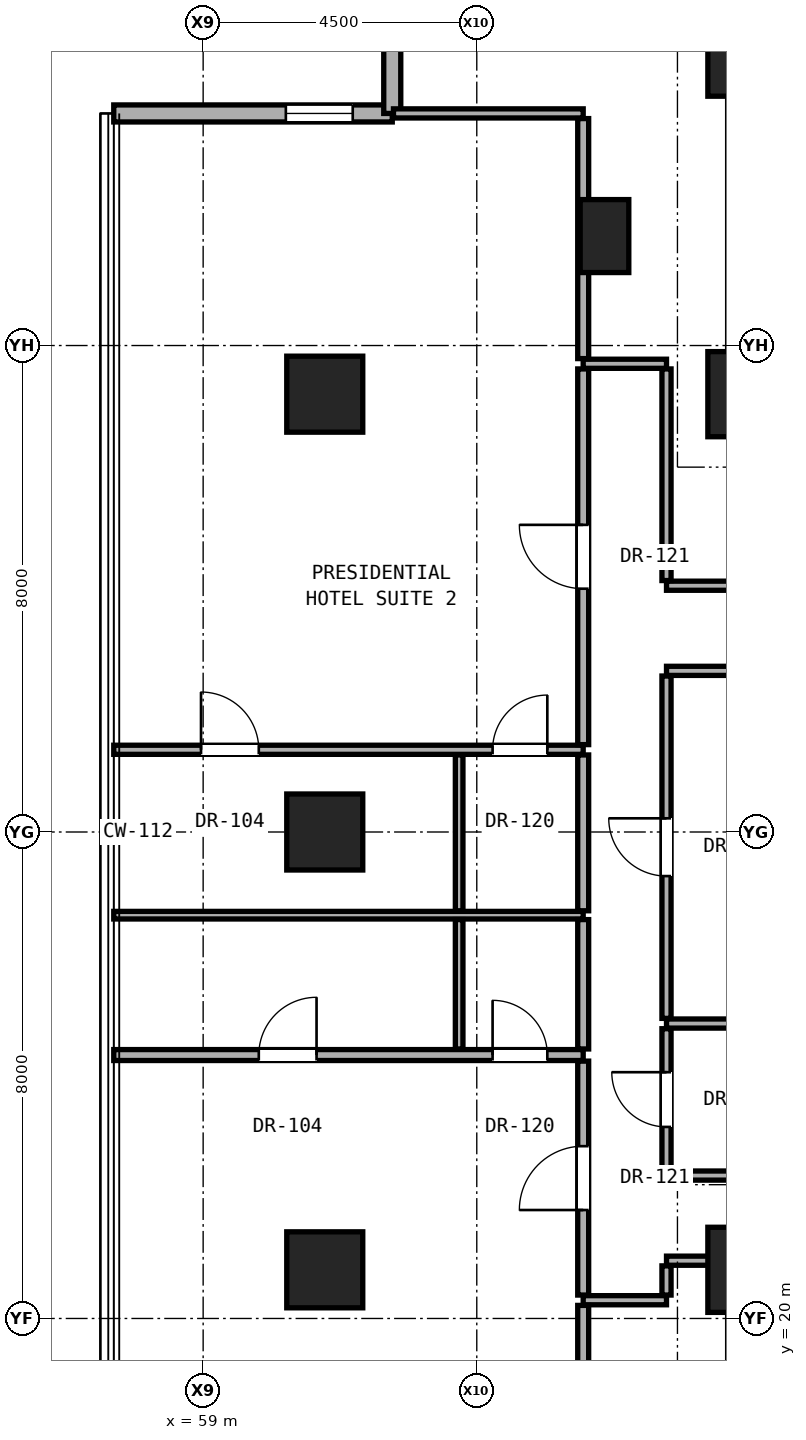
"""IFC4 building model, lengths in metres.
Left out: names, types, materials, properties, quantities, classifications, styles, units other than length and angle.
Written with IfcOpenShell. Run it as: python <this file> out.ifc"""

import sys

from ifc_helpers import new_model, si_unit, direction, frame, frame_2d, origin, origin_2d, place, context, subcontext, project, spatial, rectangle, hollow_rectangle, extrude, element, fill, save


model = new_model("IFC4")
c1 = context("Model", 3, precision=1e-05, world=origin(), true_north=direction((0.0, 1.0)))
c2 = subcontext(c1, "Body", "Model", "MODEL_VIEW")
j1 = project(units=[si_unit("LENGTHUNIT", "METRE"), si_unit("PLANEANGLEUNIT", "RADIAN")], contexts=[c1])
p1 = place(None, origin())
s1 = spatial("IfcSite", under=j1, at=p1, CompositionType="ELEMENT")
p2 = place(p1, origin())
s2 = spatial("IfcBuilding", under=s1, at=p2, CompositionType="ELEMENT")
p3 = place(p2, frame((0.0, 0.0, 38.9)))
s3 = spatial("IfcBuildingStorey", under=s2, at=p3, CompositionType="ELEMENT", Elevation=38.9)
for number, where, z_axis, x_axis in (
    (1, (68.0, 20.8, 0.0), (0.0, 0.0, 1.0), (1.0, 0.0, 0.0)),
    (2, (68.0, 35.2, 0.0), (0.0, 0.0, 1.0), (1.0, 0.0, 0.0)),
    (3, (68.0, 40.8, 0.0), (0.0, 0.0, 1.0), (1.0, 0.0, 0.0)),
):
    element("IfcColumn", number, at=place(p3, frame(where, z_axis=z_axis, x_axis=x_axis)), inside=s3, PredefinedType="COLUMN", context=c2, shape_type="SweptSolid", body=[
        extrude(rectangle(XDim=1.4, YDim=1.4, at=origin_2d()), origin(), (0.0, 0.0, 1.0), 3.3),
    ])
for number, where, z_axis, x_axis in (
    (4, (61.0, 20.8, 0.0), (0.0, 0.0, 1.0), (1.0, 0.0, 0.0)),
    (5, (61.0, 28.0, 0.0), (0.0, 0.0, 1.0), (1.0, 0.0, 0.0)),
    (6, (61.0, 35.2, 0.0), (0.0, 0.0, 1.0), (1.0, 0.0, 0.0)),
):
    element("IfcColumn", number, at=place(p3, frame(where, z_axis=z_axis, x_axis=x_axis)), inside=s3, PredefinedType="COLUMN", context=c2, shape_type="SweptSolid", body=[
        extrude(hollow_rectangle(XDim=1.25, YDim=1.25, WallThickness=0.07, at=origin_2d()), origin(), (0.0, 0.0, 1.0), 3.3),
    ])
p4 = place(p3, frame((65.6, 37.8, 0.0), z_axis=(0.0, 0.0, 1.0), x_axis=(1.0, 0.0, 0.0)))
e7 = element("IfcColumn", 7, at=p4, inside=s3, PredefinedType="PILASTER", context=c2, shape_type="SweptSolid", body=[
    extrude(rectangle(XDim=0.8, YDim=1.2, at=origin_2d()), origin(), (0.0, 0.0, 1.0), 3.3),
])
p5 = place(p3, frame((62.11, 39.816, 0.0), z_axis=(0.0, 0.0, 1.0), x_axis=(-1.0, 0.0, 0.0)))
e8 = element("IfcWall", 8, at=p5, inside=s3, PredefinedType="SOLIDWALL", context=c2, shape_type="SweptSolid", body=[
    extrude(rectangle(XDim=4.58, YDim=0.28, at=frame_2d((2.29, 0.0))), origin(), (0.0, 0.0, 1.0), 3.04),
])
p6 = place(p5, frame((0.65, 0.0, 0.85)))
e9 = element("IfcOpeningElement", 9, at=p6, cuts=e8, PredefinedType="OPENING", context=c2, shape_type="SweptSolid", body=[
    extrude(rectangle(XDim=1.1, YDim=2.0, at=frame_2d((0.55, 1.0))), frame((0.0, 0.15, 0.0), z_axis=(0.0, -1.0, 0.0), x_axis=(1.0, 0.0, 0.0)), (0.0, 0.0, 1.0), 0.3),
])
p7 = place(p3, frame((62.11, 44.396, 0.0), z_axis=(0.0, 0.0, 1.0), x_axis=(0.0, -1.0, 0.0)))
e10 = element("IfcWall", 10, at=p7, inside=s3, PredefinedType="SOLIDWALL", context=c2, shape_type="SweptSolid", body=[
    extrude(rectangle(XDim=4.58, YDim=0.28, at=frame_2d((2.29, 0.0))), origin(), (0.0, 0.0, 1.0), 3.04),
])
p8 = place(p3, frame((65.25, 20.3, 0.0), z_axis=(0.0, 0.0, 1.0), x_axis=(1.0, 0.0, 0.0)))
e11 = element("IfcWall", 11, at=p8, inside=s3, PredefinedType="PARTITIONING", context=c2, shape_type="SweptSolid", body=[
    extrude(rectangle(XDim=1.37, YDim=0.15, at=frame_2d((0.685, 0.0))), origin(), (0.0, 0.0, 1.0), 3.06),
])
p9 = place(p3, frame((66.62, 20.95, 0.0), z_axis=(0.0, 0.0, 1.0), x_axis=(1.0, 0.0, 0.0)))
e12 = element("IfcWall", 12, at=p9, inside=s3, PredefinedType="PARTITIONING", context=c2, shape_type="SweptSolid", body=[
    extrude(rectangle(XDim=1.01, YDim=0.15, at=frame_2d((0.505, 0.0))), origin(), (0.0, 0.0, 1.0), 2.452),
])
p10 = place(p3, frame((66.62, 22.35, 0.0), z_axis=(0.0, 0.0, 1.0), x_axis=(1.0, 0.0, 0.0)))
e13 = element("IfcWall", 13, at=p10, inside=s3, PredefinedType="PARTITIONING", context=c2, shape_type="SweptSolid", body=[
    extrude(rectangle(XDim=19.63, YDim=0.15, at=frame_2d((9.815, 0.0))), origin(), (0.0, 0.0, 1.0), 2.125),
])
p11 = place(p10, frame((12.085, 0.0, 0.0)))
e14 = element("IfcOpeningElement", 14, at=p11, cuts=e13, PredefinedType="OPENING", context=c2, shape_type="SweptSolid", body=[
    extrude(rectangle(XDim=0.85, YDim=2.01, at=frame_2d((0.425, 1.005))), frame((0.0, 0.085, 0.0), z_axis=(0.0, -1.0, 0.0), x_axis=(1.0, 0.0, 0.0)), (0.0, 0.0, 1.0), 0.17),
])
p12 = place(p3, frame((57.53, 24.332, 0.0), z_axis=(0.0, 0.0, 1.0), x_axis=(1.0, 0.0, 0.0)))
e15 = element("IfcWall", 15, at=p12, inside=s3, PredefinedType="PARTITIONING", context=c2, shape_type="SweptSolid", body=[
    extrude(rectangle(XDim=7.72, YDim=0.18, at=frame_2d((3.86, 0.0))), origin(), (0.0, 0.0, 1.0), 2.196),
])
p13 = place(p12, frame((2.385, 0.0, 0.0)))
e16 = element("IfcOpeningElement", 16, at=p13, cuts=e15, PredefinedType="OPENING", context=c2, shape_type="SweptSolid", body=[
    extrude(rectangle(XDim=0.95, YDim=2.15, at=frame_2d((0.475, 1.075))), frame((0.0, 0.1, 0.0), z_axis=(0.0, -1.0, 0.0), x_axis=(1.0, 0.0, 0.0)), (0.0, 0.0, 1.0), 0.2),
])
p14 = place(p12, frame((6.23, 0.0, 0.0)))
e17 = element("IfcOpeningElement", 17, at=p14, cuts=e15, PredefinedType="OPENING", context=c2, shape_type="SweptSolid", body=[
    extrude(rectangle(XDim=0.9, YDim=2.1, at=frame_2d((0.45, 1.05))), frame((0.0, 0.1, 0.0), z_axis=(0.0, -1.0, 0.0), x_axis=(1.0, 0.0, 0.0)), (0.0, 0.0, 1.0), 0.2),
])
p15 = place(p3, frame((66.62, 24.85, 0.0), z_axis=(0.0, 0.0, 1.0), x_axis=(1.0, 0.0, 0.0)))
e18 = element("IfcWall", 18, at=p15, inside=s3, PredefinedType="PARTITIONING", context=c2, shape_type="SweptSolid", body=[
    extrude(rectangle(XDim=3.13, YDim=0.15, at=frame_2d((1.565, 0.0))), origin(), (0.0, 0.0, 1.0), 2.125),
])
p16 = place(p3, frame((57.53, 26.632, 0.0), z_axis=(0.0, 0.0, 1.0), x_axis=(1.0, 0.0, 0.0)))
e19 = element("IfcWall", 19, at=p16, inside=s3, PredefinedType="PARTITIONING", context=c2, shape_type="SweptSolid", body=[
    extrude(rectangle(XDim=7.72, YDim=0.125, at=frame_2d((3.86, 0.0))), origin(), (0.0, 0.0, 1.0), 2.196),
])
p17 = place(p3, frame((57.53, 29.352, 0.0), z_axis=(0.0, 0.0, 1.0), x_axis=(1.0, 0.0, 0.0)))
e20 = element("IfcWall", 20, at=p17, inside=s3, PredefinedType="PARTITIONING", context=c2, shape_type="SweptSolid", body=[
    extrude(rectangle(XDim=7.72, YDim=0.15, at=frame_2d((3.86, 0.0))), origin(), (0.0, 0.0, 1.0), 2.196),
])
p18 = place(p17, frame((1.435, 0.0, 0.0)))
e21 = element("IfcOpeningElement", 21, at=p18, cuts=e20, PredefinedType="OPENING", context=c2, shape_type="SweptSolid", body=[
    extrude(rectangle(XDim=0.95, YDim=2.15, at=frame_2d((0.475, 1.075))), frame((0.0, 0.085, 0.0), z_axis=(0.0, -1.0, 0.0), x_axis=(1.0, 0.0, 0.0)), (0.0, 0.0, 1.0), 0.17),
])
p19 = place(p17, frame((6.23, 0.0, 0.0)))
e22 = element("IfcOpeningElement", 22, at=p19, cuts=e20, PredefinedType="OPENING", context=c2, shape_type="SweptSolid", body=[
    extrude(rectangle(XDim=0.9, YDim=2.1, at=frame_2d((0.45, 1.05))), frame((0.0, 0.085, 0.0), z_axis=(0.0, -1.0, 0.0), x_axis=(1.0, 0.0, 0.0)), (0.0, 0.0, 1.0), 0.17),
])
p20 = place(p3, frame((66.62, 30.65, 0.0), z_axis=(0.0, 0.0, 1.0), x_axis=(1.0, 0.0, 0.0)))
e23 = element("IfcWall", 23, at=p20, inside=s3, PredefinedType="PARTITIONING", context=c2, shape_type="SweptSolid", body=[
    extrude(rectangle(XDim=19.63, YDim=0.15, at=frame_2d((9.815, 0.0))), origin(), (0.0, 0.0, 1.0), 2.125),
])
p21 = place(p20, frame((3.855, 0.0, 0.0)))
e24 = element("IfcOpeningElement", 24, at=p21, cuts=e23, PredefinedType="OPENING", context=c2, shape_type="SweptSolid", body=[
    extrude(rectangle(XDim=0.85, YDim=2.01, at=frame_2d((0.425, 1.005))), frame((0.0, 0.085, 0.0), z_axis=(0.0, -1.0, 0.0), x_axis=(1.0, 0.0, 0.0)), (0.0, 0.0, 1.0), 0.17),
])
p22 = place(p20, frame((12.085, 0.0, 0.0)))
e25 = element("IfcOpeningElement", 25, at=p22, cuts=e23, PredefinedType="OPENING", context=c2, shape_type="SweptSolid", body=[
    extrude(rectangle(XDim=0.85, YDim=2.01, at=frame_2d((0.425, 1.005))), frame((0.0, 0.085, 0.0), z_axis=(0.0, -1.0, 0.0), x_axis=(1.0, 0.0, 0.0)), (0.0, 0.0, 1.0), 0.17),
])
p23 = place(p3, frame((66.62, 32.05, 0.0), z_axis=(0.0, 0.0, 1.0), x_axis=(1.0, 0.0, 0.0)))
e26 = element("IfcWall", 26, at=p23, inside=s3, PredefinedType="PARTITIONING", context=c2, shape_type="SweptSolid", body=[
    extrude(rectangle(XDim=2.18, YDim=0.15, at=frame_2d((1.09, 0.0))), origin(), (0.0, 0.0, 1.0), 2.125),
])
p24 = place(p3, frame((65.25, 35.7, 0.0), z_axis=(0.0, 0.0, 1.0), x_axis=(1.0, 0.0, 0.0)))
e27 = element("IfcWall", 27, at=p24, inside=s3, PredefinedType="PARTITIONING", context=c2, shape_type="SweptSolid", body=[
    extrude(rectangle(XDim=1.37, YDim=0.15, at=frame_2d((0.685, 0.0))), origin(), (0.0, 0.0, 1.0), 3.06),
])
p25 = place(p3, frame((62.13, 39.817, 0.0), z_axis=(0.0, 0.0, 1.0), x_axis=(1.0, 0.0, 0.0)))
e28 = element("IfcWall", 28, at=p25, inside=s3, PredefinedType="PARTITIONING", context=c2, shape_type="SweptSolid", body=[
    extrude(rectangle(XDim=3.12, YDim=0.15, at=frame_2d((1.56, 0.0))), origin(), (0.0, 0.0, 1.0), 3.06),
])
p26 = place(p3, frame((63.21, 24.432, 0.0), z_axis=(0.0, 0.0, 1.0), x_axis=(0.0, 1.0, 0.0)))
e29 = element("IfcWall", 29, at=p26, inside=s3, PredefinedType="PARTITIONING", context=c2, shape_type="SweptSolid", body=[
    extrude(rectangle(XDim=2.128, YDim=0.125, at=frame_2d((1.064, 0.0))), origin(), (0.0, 0.0, 1.0), 3.06),
])
p27 = place(p3, frame((63.21, 26.705, 0.0), z_axis=(0.0, 0.0, 1.0), x_axis=(0.0, 1.0, 0.0)))
e30 = element("IfcWall", 30, at=p27, inside=s3, PredefinedType="PARTITIONING", context=c2, shape_type="SweptSolid", body=[
    extrude(rectangle(XDim=2.562, YDim=0.125, at=frame_2d((1.281, 0.0))), origin(), (0.0, 0.0, 1.0), 2.279),
])
p28 = place(p3, frame((65.25, 16.283, 0.0), z_axis=(0.0, 0.0, 1.0), x_axis=(0.0, 1.0, 0.0)))
e31 = element("IfcWall", 31, at=p28, inside=s3, PredefinedType="PARTITIONING", context=c2, shape_type="SweptSolid", body=[
    extrude(rectangle(XDim=3.932, YDim=0.18, at=frame_2d((1.966, 0.0))), origin(), (0.0, 0.0, 1.0), 2.436),
])
p29 = place(p3, frame((65.25, 20.385, 0.0), z_axis=(0.0, 0.0, 1.0), x_axis=(0.0, 1.0, 0.0)))
e32 = element("IfcWall", 32, at=p29, inside=s3, PredefinedType="PARTITIONING", context=c2, shape_type="SweptSolid", body=[
    extrude(rectangle(XDim=3.847, YDim=0.18, at=frame_2d((1.923, 0.0))), origin(), (0.0, 0.0, 1.0), 2.452),
])
p30 = place(p29, frame((1.398, 0.0, 0.0)))
e33 = element("IfcOpeningElement", 33, at=p30, cuts=e32, PredefinedType="OPENING", context=c2, shape_type="SweptSolid", body=[
    extrude(rectangle(XDim=1.05, YDim=2.2, at=frame_2d((0.525, 1.1))), frame((0.0, 0.1, 0.0), z_axis=(0.0, -1.0, 0.0), x_axis=(1.0, 0.0, 0.0)), (0.0, 0.0, 1.0), 0.2),
])
p31 = place(p3, frame((65.25, 24.432, 0.0), z_axis=(0.0, 0.0, 1.0), x_axis=(0.0, 1.0, 0.0)))
e34 = element("IfcWall", 34, at=p31, inside=s3, PredefinedType="PARTITIONING", context=c2, shape_type="SweptSolid", body=[
    extrude(rectangle(XDim=2.128, YDim=0.18, at=frame_2d((1.064, 0.0))), origin(), (0.0, 0.0, 1.0), 3.06),
])
p32 = place(p3, frame((65.25, 26.705, 0.0), z_axis=(0.0, 0.0, 1.0), x_axis=(0.0, 1.0, 0.0)))
e35 = element("IfcWall", 35, at=p32, inside=s3, PredefinedType="PARTITIONING", context=c2, shape_type="SweptSolid", body=[
    extrude(rectangle(XDim=2.562, YDim=0.18, at=frame_2d((1.281, 0.0))), origin(), (0.0, 0.0, 1.0), 2.279),
])
p33 = place(p3, frame((65.25, 29.437, 0.0), z_axis=(0.0, 0.0, 1.0), x_axis=(0.0, 1.0, 0.0)))
e36 = element("IfcWall", 36, at=p33, inside=s3, PredefinedType="PARTITIONING", context=c2, shape_type="SweptSolid", body=[
    extrude(rectangle(XDim=6.178, YDim=0.18, at=frame_2d((3.089, 0.0))), origin(), (0.0, 0.0, 1.0), 2.452),
])
p34 = place(p33, frame((2.564, 0.0, 0.0)))
e37 = element("IfcOpeningElement", 37, at=p34, cuts=e36, PredefinedType="OPENING", context=c2, shape_type="SweptSolid", body=[
    extrude(rectangle(XDim=1.05, YDim=2.2, at=frame_2d((0.525, 1.1))), frame((0.0, 0.1, 0.0), z_axis=(0.0, -1.0, 0.0), x_axis=(1.0, 0.0, 0.0)), (0.0, 0.0, 1.0), 0.2),
])
p35 = place(p3, frame((65.25, 35.785, 0.0), z_axis=(0.0, 0.0, 1.0), x_axis=(0.0, 1.0, 0.0)))
e38 = element("IfcWall", 38, at=p35, inside=s3, PredefinedType="PARTITIONING", context=c2, shape_type="SweptSolid", body=[
    extrude(rectangle(XDim=3.947, YDim=0.18, at=frame_2d((1.974, 0.0))), origin(), (0.0, 0.0, 1.0), 2.436),
])
p36 = place(p3, frame((66.62, 20.385, 0.0), z_axis=(0.0, 0.0, 1.0), x_axis=(0.0, 1.0, 0.0)))
e39 = element("IfcWall", 39, at=p36, inside=s3, PredefinedType="PARTITIONING", context=c2, shape_type="SweptSolid", body=[
    extrude(rectangle(XDim=0.48, YDim=0.15, at=frame_2d((0.24, 0.0))), origin(), (0.0, 0.0, 1.0), 2.452),
])
p37 = place(p3, frame((66.62, 22.435, 0.0), z_axis=(0.0, 0.0, 1.0), x_axis=(0.0, 1.0, 0.0)))
e40 = element("IfcWall", 40, at=p37, inside=s3, PredefinedType="PARTITIONING", context=c2, shape_type="SweptSolid", body=[
    extrude(rectangle(XDim=2.33, YDim=0.15, at=frame_2d((1.165, 0.0))), origin(), (0.0, 0.0, 1.0), 3.06),
])
p38 = place(p37, frame((0.715, 0.0, 0.0)))
e41 = element("IfcOpeningElement", 41, at=p38, cuts=e40, PredefinedType="OPENING", context=c2, shape_type="SweptSolid", body=[
    extrude(rectangle(XDim=0.9, YDim=2.1, at=frame_2d((0.45, 1.05))), frame((0.0, 0.085, 0.0), z_axis=(0.0, -1.0, 0.0), x_axis=(1.0, 0.0, 0.0)), (0.0, 0.0, 1.0), 0.17),
])
p39 = place(p3, frame((66.62, 24.935, 0.0), z_axis=(0.0, 0.0, 1.0), x_axis=(0.0, 1.0, 0.0)))
e42 = element("IfcWall", 42, at=p39, inside=s3, PredefinedType="PARTITIONING", context=c2, shape_type="SweptSolid", body=[
    extrude(rectangle(XDim=5.63, YDim=0.15, at=frame_2d((2.815, 0.0))), origin(), (0.0, 0.0, 1.0), 2.279),
])
p40 = place(p39, frame((2.34, 0.0, 0.0)))
e43 = element("IfcOpeningElement", 43, at=p40, cuts=e42, PredefinedType="OPENING", context=c2, shape_type="SweptSolid", body=[
    extrude(rectangle(XDim=0.95, YDim=2.15, at=frame_2d((0.475, 1.075))), frame((0.0, 0.085, 0.0), z_axis=(0.0, -1.0, 0.0), x_axis=(1.0, 0.0, 0.0)), (0.0, 0.0, 1.0), 0.17),
])
p41 = place(p3, frame((66.62, 32.135, 0.0), z_axis=(0.0, 0.0, 1.0), x_axis=(0.0, 1.0, 0.0)))
e44 = element("IfcWall", 44, at=p41, inside=s3, PredefinedType="PARTITIONING", context=c2, shape_type="SweptSolid", body=[
    extrude(rectangle(XDim=3.48, YDim=0.15, at=frame_2d((1.74, 0.0))), origin(), (0.0, 0.0, 1.0), 2.452),
])
p42 = place(p6, origin())
e45 = element("IfcWindow", 45, at=p42, inside=s3, PartitioningType="SINGLE_PANEL", PredefinedType="WINDOW", context=c2, shape_type="SweptSolid", body=[
    extrude(rectangle(XDim=1.1, YDim=2.0, at=frame_2d((0.55, 1.0))), frame((0.0, 0.03, 0.0), z_axis=(0.0, -1.0, 0.0), x_axis=(1.0, 0.0, 0.0)), (0.0, 0.0, 1.0), 0.06),
])
fill(e9, e45)
p43 = place(p38, origin())
e46 = element("IfcDoor", 46, at=p43, inside=s3, OperationType="SINGLE_SWING_RIGHT", PredefinedType="DOOR", context=c2, shape_type="SweptSolid", body=[
    extrude(rectangle(XDim=0.9, YDim=2.1, at=frame_2d((0.45, 1.05))), frame((0.0, 0.025, 0.0), z_axis=(0.0, -1.0, 0.0), x_axis=(1.0, 0.0, 0.0)), (0.0, 0.0, 1.0), 0.05),
])
fill(e41, e46)
p44 = place(p30, origin())
e47 = element("IfcDoor", 47, at=p44, inside=s3, OperationType="SINGLE_SWING_LEFT", PredefinedType="DOOR", context=c2, shape_type="SweptSolid", body=[
    extrude(rectangle(XDim=1.05, YDim=2.2, at=frame_2d((0.525, 1.1))), frame((0.0, 0.025, 0.0), z_axis=(0.0, -1.0, 0.0), x_axis=(1.0, 0.0, 0.0)), (0.0, 0.0, 1.0), 0.05),
])
fill(e33, e47)
p45 = place(p13, origin())
e48 = element("IfcDoor", 48, at=p45, inside=s3, OperationType="SINGLE_SWING_RIGHT", PredefinedType="DOOR", context=c2, shape_type="SweptSolid", body=[
    extrude(rectangle(XDim=0.95, YDim=2.15, at=frame_2d((0.475, 1.075))), frame((0.0, 0.025, 0.0), z_axis=(0.0, -1.0, 0.0), x_axis=(1.0, 0.0, 0.0)), (0.0, 0.0, 1.0), 0.05),
])
fill(e16, e48)
p46 = place(p14, origin())
e49 = element("IfcDoor", 49, at=p46, inside=s3, OperationType="SINGLE_SWING_LEFT", PredefinedType="DOOR", context=c2, shape_type="SweptSolid", body=[
    extrude(rectangle(XDim=0.9, YDim=2.1, at=frame_2d((0.45, 1.05))), frame((0.0, 0.025, 0.0), z_axis=(0.0, -1.0, 0.0), x_axis=(1.0, 0.0, 0.0)), (0.0, 0.0, 1.0), 0.05),
])
fill(e17, e49)
p47 = place(p34, origin())
e50 = element("IfcDoor", 50, at=p47, inside=s3, OperationType="SINGLE_SWING_RIGHT", PredefinedType="DOOR", context=c2, shape_type="SweptSolid", body=[
    extrude(rectangle(XDim=1.05, YDim=2.2, at=frame_2d((0.525, 1.1))), frame((0.0, 0.025, 0.0), z_axis=(0.0, -1.0, 0.0), x_axis=(1.0, 0.0, 0.0)), (0.0, 0.0, 1.0), 0.05),
])
fill(e37, e50)
p48 = place(p18, origin())
e51 = element("IfcDoor", 51, at=p48, inside=s3, OperationType="SINGLE_SWING_LEFT", PredefinedType="DOOR", context=c2, shape_type="SweptSolid", body=[
    extrude(rectangle(XDim=0.95, YDim=2.15, at=frame_2d((0.475, 1.075))), frame((0.0, 0.025, 0.0), z_axis=(0.0, -1.0, 0.0), x_axis=(1.0, 0.0, 0.0)), (0.0, 0.0, 1.0), 0.05),
])
fill(e21, e51)
p49 = place(p19, origin())
e52 = element("IfcDoor", 52, at=p49, inside=s3, OperationType="SINGLE_SWING_RIGHT", PredefinedType="DOOR", context=c2, shape_type="SweptSolid", body=[
    extrude(rectangle(XDim=0.9, YDim=2.1, at=frame_2d((0.45, 1.05))), frame((0.0, 0.025, 0.0), z_axis=(0.0, -1.0, 0.0), x_axis=(1.0, 0.0, 0.0)), (0.0, 0.0, 1.0), 0.05),
])
fill(e22, e52)
p50 = place(p40, origin())
e53 = element("IfcDoor", 53, at=p50, inside=s3, OperationType="SINGLE_SWING_RIGHT", PredefinedType="DOOR", context=c2, shape_type="SweptSolid", body=[
    extrude(rectangle(XDim=0.95, YDim=2.15, at=frame_2d((0.475, 1.075))), frame((0.0, 0.025, 0.0), z_axis=(0.0, -1.0, 0.0), x_axis=(1.0, 0.0, 0.0)), (0.0, 0.0, 1.0), 0.05),
])
fill(e43, e53)
save(model, sys.argv[1])
